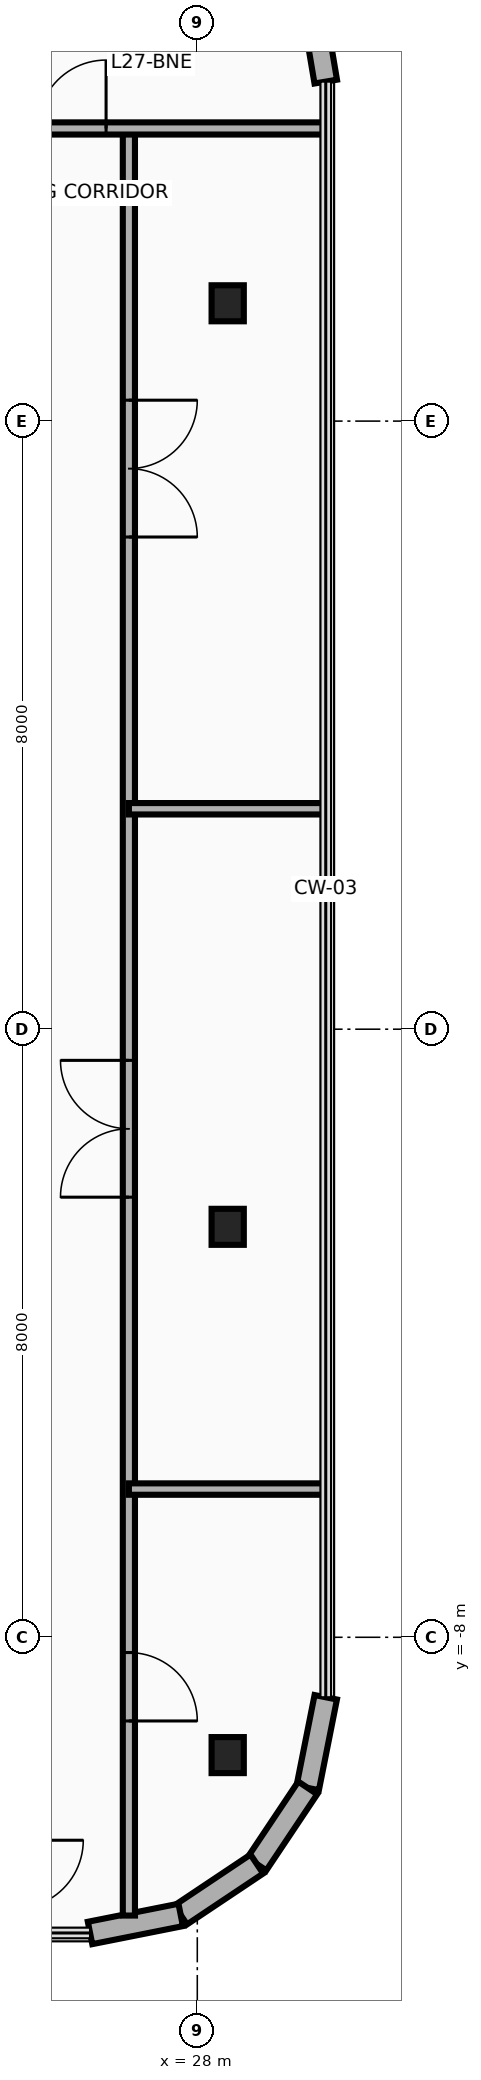
"""IFC4 building model, lengths in metres.
Left out: names, types, materials, properties, quantities, classifications, styles, units other than length and angle.
Written with IfcOpenShell. Run it as: python <this file> out.ifc"""

import sys

from ifc_helpers import new_model, si_unit, direction, frame, frame_2d, origin, origin_2d, place, context, subcontext, project, spatial, rectangle, i_section, extrude, source, transform, mapped, element, fill, save


model = new_model("IFC4")
c1 = context("Model", 3, precision=1e-05, world=origin(), true_north=direction((0.0, 1.0)))
c2 = subcontext(c1, "Body", "Model", "MODEL_VIEW")
j1 = project(units=[si_unit("LENGTHUNIT", "METRE"), si_unit("PLANEANGLEUNIT", "RADIAN")], contexts=[c1])
p1 = place(None, origin())
s1 = spatial("IfcSite", under=j1, at=p1, CompositionType="ELEMENT")
p2 = place(p1, origin())
s2 = spatial("IfcBuilding", under=s1, at=p2, CompositionType="ELEMENT")
p3 = place(p2, frame((0.0, 0.0, 109.4)))
s3 = spatial("IfcBuildingStorey", under=s2, at=p3, CompositionType="ELEMENT", Elevation=109.4)
m1 = source(origin(), c2, "Body", "SweptSolid", [
    extrude(i_section(OverallWidth=0.424, OverallDepth=0.474, WebThickness=0.048, FlangeThickness=0.077, at=origin_2d()), origin(), (0.0, 0.0, 1.0), 3.7),
])
for number, where, z_axis, x_axis in (
    (1, (28.4, -9.55, 0.0), (0.0, 0.0, 1.0), (1.0, 0.0, 0.0)),
    (2, (28.4, -2.6, 0.0), (0.0, 0.0, 1.0), (1.0, 0.0, 0.0)),
    (3, (28.4, 9.55, 0.0), (0.0, 0.0, 1.0), (1.0, 0.0, 0.0)),
):
    element("IfcColumn", number, at=place(p3, frame(where, z_axis=z_axis, x_axis=x_axis)), inside=s3, PredefinedType="COLUMN", context=c2, shape_type="MappedRepresentation", body=[
        mapped(m1, transform((0.0, 0.0, 0.0), x_axis=(1.0, 0.0, 0.0), y_axis=(0.0, 1.0, 0.0), z_axis=(0.0, 0.0, 1.0), scale=1.0)),
    ])
p4 = place(p3, frame((29.518, 13.488, 0.0), z_axis=(0.0, 0.0, 1.0), x_axis=(0.166156796952, -0.986099345313, 0.0)))
e4 = element("IfcWall", 4, at=p4, inside=s3, PredefinedType="SOLIDWALL", context=c2, shape_type="SweptSolid", body=[
    extrude(rectangle(XDim=1.036, YDim=0.3, at=frame_2d((0.518, 0.0))), origin(), (0.0, 0.0, 1.0), 3.46),
])
p5 = place(p3, frame((29.69, -8.789, 0.0), z_axis=(0.0, 0.0, 1.0), x_axis=(-0.194996050505, -0.980804027463, 0.0)))
e5 = element("IfcWall", 5, at=p5, inside=s3, PredefinedType="SOLIDWALL", context=c2, shape_type="SweptSolid", body=[
    extrude(rectangle(XDim=1.216, YDim=0.3, at=frame_2d((0.608, 0.0))), origin(), (0.0, 0.0, 1.0), 3.46),
])
for number, where, z_axis, x_axis in (
    (6, (29.453, -9.982, 0.0), (0.0, 0.0, 1.0), (-0.556, -0.831, 0.0)),
    (7, (28.783, -10.983, 0.0), (0.0, 0.0, 1.0), (-0.831, -0.556, 0.0)),
):
    element("IfcWall", number, at=place(p3, frame(where, z_axis=z_axis, x_axis=x_axis)), inside=s3, PredefinedType="SOLIDWALL", context=c2, shape_type="SweptSolid", body=[
        extrude(rectangle(XDim=1.205, YDim=0.3, at=frame_2d((0.603, 0.0))), origin(), (0.0, 0.0, 1.0), 3.46),
    ])
p6 = place(p3, frame((27.782, -11.653, 0.0), z_axis=(0.0, 0.0, 1.0), x_axis=(-0.980811661072, -0.194957650543, 0.0)))
e8 = element("IfcWall", 8, at=p6, inside=s3, PredefinedType="SOLIDWALL", context=c2, shape_type="SweptSolid", body=[
    extrude(rectangle(XDim=1.216, YDim=0.3, at=frame_2d((0.608, 0.0))), origin(), (0.0, 0.0, 1.0), 3.46),
])
p7 = place(p3, frame((27.1, -11.661, 0.0), z_axis=(0.0, 0.0, 1.0), x_axis=(0.0, 1.0, 0.0)))
e9 = element("IfcWall", 9, at=p7, inside=s3, PredefinedType="PARTITIONING", context=c2, shape_type="SweptSolid", body=[
    extrude(rectangle(XDim=23.511, YDim=0.16, at=frame_2d((11.755, 0.0))), origin(), (0.0, 0.0, 1.0), 2.666),
])
p8 = place(p7, frame((2.56, 0.0, 0.0)))
e10 = element("IfcOpeningElement", 10, at=p8, cuts=e9, PredefinedType="OPENING", context=c2, shape_type="SweptSolid", body=[
    extrude(rectangle(XDim=0.9, YDim=2.1, at=frame_2d((0.45, 1.05))), frame((0.0, 0.095, 0.0), z_axis=(0.0, -1.0, 0.0), x_axis=(1.0, 0.0, 0.0)), (0.0, 0.0, 1.0), 0.19),
])
p9 = place(p7, frame((9.451, 0.0, 0.0)))
e11 = element("IfcOpeningElement", 11, at=p9, cuts=e9, PredefinedType="OPENING", context=c2, shape_type="SweptSolid", body=[
    extrude(rectangle(XDim=1.8, YDim=2.15, at=frame_2d((0.9, 1.075))), frame((0.0, 0.095, 0.0), z_axis=(0.0, -1.0, 0.0), x_axis=(1.0, 0.0, 0.0)), (0.0, 0.0, 1.0), 0.19),
])
p10 = place(p7, frame((18.136, 0.0, 0.0)))
e12 = element("IfcOpeningElement", 12, at=p10, cuts=e9, PredefinedType="OPENING", context=c2, shape_type="SweptSolid", body=[
    extrude(rectangle(XDim=1.8, YDim=2.15, at=frame_2d((0.9, 1.075))), frame((0.0, 0.095, 0.0), z_axis=(0.0, -1.0, 0.0), x_axis=(1.0, 0.0, 0.0)), (0.0, 0.0, 1.0), 0.19),
])
p11 = place(p3, frame((25.6, 11.85, 0.0), z_axis=(0.0, 0.0, 1.0), x_axis=(1.0, 0.0, 0.0)))
e13 = element("IfcWall", 13, at=p11, inside=s3, PredefinedType="PARTITIONING", context=c2, shape_type="SweptSolid", body=[
    extrude(rectangle(XDim=4.09, YDim=0.16, at=frame_2d((2.045, 0.0))), origin(), (0.0, 0.0, 1.0), 2.896),
])
p12 = place(p11, frame((0.3, 0.0, 0.0)))
e14 = element("IfcOpeningElement", 14, at=p12, cuts=e13, PredefinedType="OPENING", context=c2, shape_type="SweptSolid", body=[
    extrude(rectangle(XDim=0.9, YDim=2.1, at=frame_2d((0.45, 1.05))), frame((0.0, 0.095, 0.0), z_axis=(0.0, -1.0, 0.0), x_axis=(1.0, 0.0, 0.0)), (0.0, 0.0, 1.0), 0.19),
])
for number, where, z_axis, x_axis in (
    (15, (27.1, -6.05, 0.0), (0.0, 0.0, 1.0), (1.0, 0.0, 0.0)),
    (16, (27.1, 2.9, 0.0), (0.0, 0.0, 1.0), (1.0, 0.0, 0.0)),
):
    element("IfcWall", number, at=place(p3, frame(where, z_axis=z_axis, x_axis=x_axis)), inside=s3, PredefinedType="PARTITIONING", context=c2, shape_type="SweptSolid", body=[
        extrude(rectangle(XDim=2.59, YDim=0.15, at=frame_2d((1.295, 0.0))), origin(), (0.0, 0.0, 1.0), 2.896),
    ])
p13 = place(p12, origin())
e17 = element("IfcDoor", 17, at=p13, inside=s3, OperationType="SINGLE_SWING_RIGHT", PredefinedType="DOOR", context=c2, shape_type="SweptSolid", body=[
    extrude(rectangle(XDim=0.9, YDim=2.1, at=frame_2d((0.45, 1.05))), frame((0.0, 0.025, 0.0), z_axis=(0.0, -1.0, 0.0), x_axis=(1.0, 0.0, 0.0)), (0.0, 0.0, 1.0), 0.05),
])
fill(e14, e17)
p14 = place(p8, frame((0.9, 0.0, 0.0), z_axis=(0.0, 0.0, 1.0), x_axis=(-1.0, 0.0, 0.0)))
e18 = element("IfcDoor", 18, at=p14, inside=s3, OperationType="SINGLE_SWING_LEFT", PredefinedType="DOOR", context=c2, shape_type="SweptSolid", body=[
    extrude(rectangle(XDim=0.9, YDim=2.1, at=frame_2d((0.45, 1.05))), frame((0.0, 0.025, 0.0), z_axis=(0.0, -1.0, 0.0), x_axis=(1.0, 0.0, 0.0)), (0.0, 0.0, 1.0), 0.05),
])
fill(e10, e18)
p15 = place(p9, origin())
e19 = element("IfcDoor", 19, at=p15, inside=s3, OperationType="DOUBLE_DOOR_SINGLE_SWING", PredefinedType="DOOR", context=c2, shape_type="SweptSolid", body=[
    extrude(rectangle(XDim=1.8, YDim=2.15, at=frame_2d((0.9, 1.075))), frame((0.0, 0.025, 0.0), z_axis=(0.0, -1.0, 0.0), x_axis=(1.0, 0.0, 0.0)), (0.0, 0.0, 1.0), 0.05),
])
fill(e11, e19)
p16 = place(p10, frame((1.8, 0.0, 0.0), z_axis=(0.0, 0.0, 1.0), x_axis=(-1.0, 0.0, 0.0)))
e20 = element("IfcDoor", 20, at=p16, inside=s3, OperationType="DOUBLE_DOOR_SINGLE_SWING", PredefinedType="DOOR", context=c2, shape_type="SweptSolid", body=[
    extrude(rectangle(XDim=1.8, YDim=2.15, at=frame_2d((0.9, 1.075))), frame((0.0, 0.025, 0.0), z_axis=(0.0, -1.0, 0.0), x_axis=(1.0, 0.0, 0.0)), (0.0, 0.0, 1.0), 0.05),
])
fill(e12, e20)
save(model, sys.argv[1])
